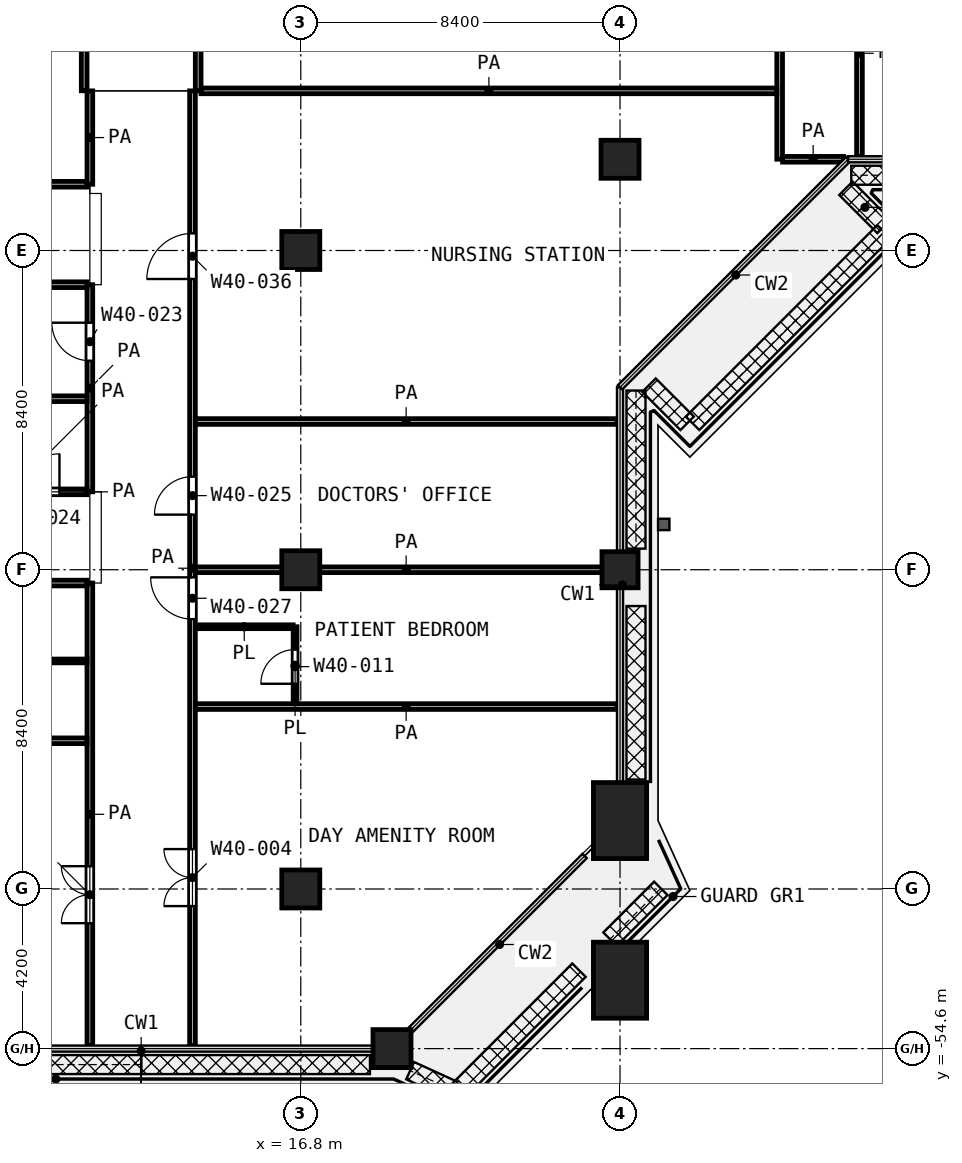
"""IFC4 building model, lengths in metres.
Left out: names, types, materials, properties, quantities, classifications, styles, units other than length and angle.
Written with IfcOpenShell. Run it as: python <this file> out.ifc"""

import sys

from ifc_helpers import new_model, si_unit, direction, frame, frame_2d, origin, origin_2d, place, context, subcontext, project, spatial, rectangle, extrude, element, fill, save


model = new_model("IFC4")
c1 = context("Model", 3, precision=1e-05, world=origin(), true_north=direction((0.0, 1.0)))
c2 = subcontext(c1, "Body", "Model", "MODEL_VIEW")
j1 = project(units=[si_unit("LENGTHUNIT", "METRE"), si_unit("PLANEANGLEUNIT", "RADIAN")], contexts=[c1])
p1 = place(None, origin())
s1 = spatial("IfcSite", under=j1, at=p1, CompositionType="ELEMENT")
p2 = place(p1, origin())
s2 = spatial("IfcBuilding", under=s1, at=p2, CompositionType="ELEMENT")
p3 = place(p2, frame((0.0, 0.0, 175.2)))
s3 = spatial("IfcBuildingStorey", under=s2, at=p3, CompositionType="ELEMENT", Elevation=175.2)
for number, where, z_axis, x_axis in (
    (1, (25.2, -31.2, 0.0), (0.0, 0.0, 1.0), (1.0, 0.0, 0.0)),
    (2, (16.8, -33.6, 0.0), (0.0, 0.0, 1.0), (1.0, 0.0, 0.0)),
    (3, (16.8, -42.0, 0.0), (0.0, 0.0, 1.0), (1.0, 0.0, 0.0)),
):
    element("IfcColumn", number, at=place(p3, frame(where, z_axis=z_axis, x_axis=x_axis)), inside=s3, PredefinedType="COLUMN", context=c2, shape_type="SweptSolid", body=[
        extrude(rectangle(XDim=1.0, YDim=1.0, at=origin_2d()), origin(), (0.0, 0.0, 1.0), 4.2),
    ])
p4 = place(p3, frame((25.2, -42.0, 0.0), z_axis=(0.0, 0.0, 1.0), x_axis=(1.0, 0.0, 0.0)))
e4 = element("IfcColumn", 4, at=p4, inside=s3, PredefinedType="COLUMN", context=c2, shape_type="SweptSolid", body=[
    extrude(rectangle(XDim=0.95, YDim=0.95, at=origin_2d()), origin(), (0.0, 0.0, 1.0), 4.2),
])
p5 = place(p3, frame((25.2, -48.6, 0.0), z_axis=(0.0, 0.0, 1.0), x_axis=(0.0, -1.0, 0.0)))
e5 = element("IfcColumn", 5, at=p5, inside=s3, PredefinedType="COLUMN", context=c2, shape_type="SweptSolid", body=[
    extrude(rectangle(XDim=2.0, YDim=1.4, at=origin_2d()), origin(), (0.0, 0.0, 1.0), 4.2),
])
for number, where, z_axis, x_axis in (
    (6, (16.8, -50.4, 0.0), (0.0, 0.0, 1.0), (1.0, 0.0, 0.0)),
    (7, (19.2, -54.6, 0.0), (0.0, 0.0, 1.0), (1.0, 0.0, 0.0)),
):
    element("IfcColumn", number, at=place(p3, frame(where, z_axis=z_axis, x_axis=x_axis)), inside=s3, PredefinedType="COLUMN", context=c2, shape_type="SweptSolid", body=[
        extrude(rectangle(XDim=1.0, YDim=1.0, at=origin_2d()), origin(), (0.0, 0.0, 1.0), 4.2),
    ])
p6 = place(p3, frame((25.2, -52.8, 0.0), z_axis=(0.0, 0.0, 1.0), x_axis=(0.0, -1.0, 0.0)))
e8 = element("IfcColumn", 8, at=p6, inside=s3, PredefinedType="COLUMN", context=c2, shape_type="SweptSolid", body=[
    extrude(rectangle(XDim=2.0, YDim=1.4, at=origin_2d()), origin(), (0.0, 0.0, 1.0), 4.2),
])
p7 = place(p3, frame((8.6, -44.4, 0.0), z_axis=(0.0, 0.0, 1.0), x_axis=(1.0, 0.0, 0.0)))
e9 = element("IfcWall", 9, at=p7, inside=s3, PredefinedType="PARTITIONING", context=c2, shape_type="SweptSolid", body=[
    extrude(rectangle(XDim=2.575, YDim=0.1, at=frame_2d((1.288, 0.0))), origin(), (0.0, 0.0, 1.0), 3.6),
])
p8 = place(p3, frame((14.025, -43.5, 0.0), z_axis=(0.0, 0.0, 1.0), x_axis=(1.0, 0.0, 0.0)))
e10 = element("IfcWall", 10, at=p8, inside=s3, PredefinedType="PARTITIONING", context=c2, shape_type="SweptSolid", body=[
    extrude(rectangle(XDim=2.575, YDim=0.1, at=frame_2d((1.288, 0.0))), origin(), (0.0, 0.0, 1.0), 3.6),
])
p9 = place(p3, frame((16.65, -45.525, 0.0), z_axis=(0.0, 0.0, 1.0), x_axis=(0.0, 1.0, 0.0)))
e11 = element("IfcWall", 11, at=p9, inside=s3, PredefinedType="PARTITIONING", context=c2, shape_type="SweptSolid", body=[
    extrude(rectangle(XDim=2.025, YDim=0.1, at=frame_2d((1.012, 0.0))), origin(), (0.0, 0.0, 1.0), 3.6),
])
p10 = place(p9, frame((0.525, 0.0, 0.0)))
e12 = element("IfcOpeningElement", 12, at=p10, cuts=e11, PredefinedType="OPENING", context=c2, shape_type="SweptSolid", body=[
    extrude(rectangle(XDim=0.9, YDim=2.1, at=frame_2d((0.45, 1.05))), frame((0.0, 0.06, 0.0), z_axis=(0.0, -1.0, 0.0), x_axis=(1.0, 0.0, 0.0)), (0.0, 0.0, 1.0), 0.12),
])
p11 = place(p3, frame((0.08, -46.5, 0.0), z_axis=(0.0, 0.0, 1.0), x_axis=(1.0, 0.0, 0.0)))
e13 = element("IfcWall", 13, at=p11, inside=s3, PredefinedType="PARTITIONING", context=c2, shape_type="SweptSolid", body=[
    extrude(rectangle(XDim=11.095, YDim=0.15, at=frame_2d((5.547, 0.0))), origin(), (0.0, 0.0, 1.0), 3.6),
])
p12 = place(p3, frame((14.025, -45.6, 0.0), z_axis=(0.0, 0.0, 1.0), x_axis=(1.0, 0.0, 0.0)))
e14 = element("IfcWall", 14, at=p12, inside=s3, PredefinedType="PARTITIONING", context=c2, shape_type="SweptSolid", body=[
    extrude(rectangle(XDim=11.095, YDim=0.15, at=frame_2d((5.548, 0.0))), origin(), (0.0, 0.0, 1.0), 3.6),
])
p13 = place(p3, frame((2.327, -42.35, 0.0), z_axis=(0.0, 0.0, 1.0), x_axis=(1.0, 0.0, 0.0)))
e15 = element("IfcWall", 15, at=p13, inside=s3, PredefinedType="PARTITIONING", context=c2, shape_type="SweptSolid", body=[
    extrude(rectangle(XDim=8.848, YDim=0.15, at=frame_2d((4.424, 0.0))), origin(), (0.0, 0.0, 1.0), 3.6),
])
p14 = place(p13, frame((4.324, 0.0, 0.0)))
e16 = element("IfcOpeningElement", 16, at=p14, cuts=e15, PredefinedType="OPENING", context=c2, shape_type="SweptSolid", body=[
    extrude(rectangle(XDim=1.2, YDim=2.1, at=frame_2d((0.6, 1.05))), frame((0.0, 0.085, 0.0), z_axis=(0.0, -1.0, 0.0), x_axis=(1.0, 0.0, 0.0)), (0.0, 0.0, 1.0), 0.17),
])
p15 = place(p13, frame((2.324, 0.0, 0.0)))
e17 = element("IfcOpeningElement", 17, at=p15, cuts=e15, PredefinedType="OPENING", context=c2, shape_type="SweptSolid", body=[
    extrude(rectangle(XDim=1.2, YDim=2.1, at=frame_2d((0.6, 1.05))), frame((0.0, 0.085, 0.0), z_axis=(0.0, -1.0, 0.0), x_axis=(1.0, 0.0, 0.0)), (0.0, 0.0, 1.0), 0.17),
])
p16 = place(p3, frame((14.025, -42.0, 0.0), z_axis=(0.0, 0.0, 1.0), x_axis=(1.0, 0.0, 0.0)))
e18 = element("IfcWall", 18, at=p16, inside=s3, PredefinedType="PARTITIONING", context=c2, shape_type="SweptSolid", body=[
    extrude(rectangle(XDim=11.095, YDim=0.15, at=frame_2d((5.548, 0.0))), origin(), (0.0, 0.0, 1.0), 3.6),
])
p17 = place(p3, frame((8.65, -39.95, 0.0), z_axis=(0.0, 0.0, 1.0), x_axis=(1.0, 0.0, 0.0)))
e19 = element("IfcWall", 19, at=p17, inside=s3, PredefinedType="PARTITIONING", context=c2, shape_type="SweptSolid", body=[
    extrude(rectangle(XDim=2.525, YDim=0.15, at=frame_2d((1.263, 0.0))), origin(), (0.0, 0.0, 1.0), 3.6),
])
p18 = place(p17, frame((0.8, 0.0, 0.0)))
e20 = element("IfcOpeningElement", 20, at=p18, cuts=e19, PredefinedType="OPENING", context=c2, shape_type="SweptSolid", body=[
    extrude(rectangle(XDim=1.0, YDim=2.1, at=frame_2d((0.5, 1.05))), frame((0.0, 0.085, 0.0), z_axis=(0.0, -1.0, 0.0), x_axis=(1.0, 0.0, 0.0)), (0.0, 0.0, 1.0), 0.17),
])
p19 = place(p3, frame((14.025, -38.1, 0.0), z_axis=(0.0, 0.0, 1.0), x_axis=(1.0, 0.0, 0.0)))
e21 = element("IfcWall", 21, at=p19, inside=s3, PredefinedType="PARTITIONING", context=c2, shape_type="SweptSolid", body=[
    extrude(rectangle(XDim=11.095, YDim=0.15, at=frame_2d((5.548, 0.0))), origin(), (0.0, 0.0, 1.0), 3.6),
])
p20 = place(p3, frame((8.65, -37.5, 0.0), z_axis=(0.0, 0.0, 1.0), x_axis=(1.0, 0.0, 0.0)))
e22 = element("IfcWall", 22, at=p20, inside=s3, PredefinedType="PARTITIONING", context=c2, shape_type="SweptSolid", body=[
    extrude(rectangle(XDim=2.525, YDim=0.15, at=frame_2d((1.263, 0.0))), origin(), (0.0, 0.0, 1.0), 3.6),
])
p21 = place(p3, frame((8.975, -34.5, 0.0), z_axis=(0.0, 0.0, 1.0), x_axis=(1.0, 0.0, 0.0)))
e23 = element("IfcWall", 23, at=p21, inside=s3, PredefinedType="PARTITIONING", context=c2, shape_type="SweptSolid", body=[
    extrude(rectangle(XDim=2.2, YDim=0.15, at=frame_2d((1.1, 0.0))), origin(), (0.0, 0.0, 1.0), 3.6),
])
p22 = place(p3, frame((0.08, -31.857, 0.0), z_axis=(0.0, 0.0, 1.0), x_axis=(1.0, 0.0, 0.0)))
e24 = element("IfcWall", 24, at=p22, inside=s3, PredefinedType="PARTITIONING", context=c2, shape_type="SweptSolid", body=[
    extrude(rectangle(XDim=11.095, YDim=0.15, at=frame_2d((5.547, 0.0))), origin(), (0.0, 0.0, 1.0), 3.6),
])
p23 = place(p22, frame((4.945, 0.0, 0.0)))
e25 = element("IfcOpeningElement", 25, at=p23, cuts=e24, PredefinedType="OPENING", context=c2, shape_type="SweptSolid", body=[
    extrude(rectangle(XDim=1.2, YDim=2.1, at=frame_2d((0.6, 1.05))), frame((0.0, 0.085, 0.0), z_axis=(0.0, -1.0, 0.0), x_axis=(1.0, 0.0, 0.0)), (0.0, 0.0, 1.0), 0.17),
])
p24 = place(p3, frame((29.477, -31.2, 0.0), z_axis=(0.0, 0.0, 1.0), x_axis=(1.0, 0.0, 0.0)))
e26 = element("IfcWall", 26, at=p24, inside=s3, PredefinedType="PARTITIONING", context=c2, shape_type="SweptSolid", body=[
    extrude(rectangle(XDim=1.61, YDim=0.15, at=frame_2d((0.805, 0.0))), origin(), (0.0, 0.0, 1.0), 3.6),
])
p25 = place(p3, frame((14.175, -29.4, 0.0), z_axis=(0.0, 0.0, 1.0), x_axis=(1.0, 0.0, 0.0)))
e27 = element("IfcWall", 27, at=p25, inside=s3, PredefinedType="PARTITIONING", context=c2, shape_type="SweptSolid", body=[
    extrude(rectangle(XDim=15.15, YDim=0.15, at=frame_2d((7.575, 0.0))), origin(), (0.0, 0.0, 1.0), 3.6),
])
p26 = place(p3, frame((11.1, -29.398, 0.0), z_axis=(0.0, 0.0, 1.0), x_axis=(0.0, 1.0, 0.0)))
e28 = element("IfcWall", 28, at=p26, inside=s3, PredefinedType="PARTITIONING", context=c2, shape_type="SweptSolid", body=[
    extrude(rectangle(XDim=4.498, YDim=0.15, at=frame_2d((2.249, 0.0))), origin(), (0.0, 0.0, 1.0), 3.6),
])
p27 = place(p3, frame((11.25, -54.52, 0.0), z_axis=(0.0, 0.0, 1.0), x_axis=(0.0, 1.0, 0.0)))
e29 = element("IfcWall", 29, at=p27, inside=s3, PredefinedType="PARTITIONING", context=c2, shape_type="SweptSolid", body=[
    extrude(rectangle(XDim=12.17, YDim=0.15, at=frame_2d((6.085, 0.0))), origin(), (0.0, 0.0, 1.0), 3.6),
])
p28 = place(p27, frame((3.22, 0.0, 0.0)))
e30 = element("IfcOpeningElement", 30, at=p28, cuts=e29, PredefinedType="OPENING", context=c2, shape_type="SweptSolid", body=[
    extrude(rectangle(XDim=1.5, YDim=2.1, at=frame_2d((0.75, 1.05))), frame((0.0, 0.085, 0.0), z_axis=(0.0, -1.0, 0.0), x_axis=(1.0, 0.0, 0.0)), (0.0, 0.0, 1.0), 0.17),
])
p29 = place(p3, frame((11.25, -39.95, 0.0), z_axis=(0.0, 0.0, 1.0), x_axis=(0.0, 1.0, 0.0)))
e31 = element("IfcWall", 31, at=p29, inside=s3, PredefinedType="PARTITIONING", context=c2, shape_type="SweptSolid", body=[
    extrude(rectangle(XDim=5.45, YDim=0.15, at=frame_2d((2.725, 0.0))), origin(), (0.0, 0.0, 1.0), 3.6),
])
p30 = place(p29, frame((3.45, 0.0, 0.0)))
e32 = element("IfcOpeningElement", 32, at=p30, cuts=e31, PredefinedType="OPENING", context=c2, shape_type="SweptSolid", body=[
    extrude(rectangle(XDim=1.0, YDim=2.1, at=frame_2d((0.5, 1.05))), frame((0.0, 0.085, 0.0), z_axis=(0.0, -1.0, 0.0), x_axis=(1.0, 0.0, 0.0)), (0.0, 0.0, 1.0), 0.17),
])
p31 = place(p3, frame((11.25, -31.857, 0.0), z_axis=(0.0, 0.0, 1.0), x_axis=(0.0, 1.0, 0.0)))
e33 = element("IfcWall", 33, at=p31, inside=s3, PredefinedType="PARTITIONING", context=c2, shape_type="SweptSolid", body=[
    extrude(rectangle(XDim=2.457, YDim=0.15, at=frame_2d((1.229, 0.0))), origin(), (0.0, 0.0, 1.0), 3.6),
])
p32 = place(p3, frame((13.95, -54.52, 0.0), z_axis=(0.0, 0.0, 1.0), x_axis=(0.0, 1.0, 0.0)))
e34 = element("IfcWall", 34, at=p32, inside=s3, PredefinedType="PARTITIONING", context=c2, shape_type="SweptSolid", body=[
    extrude(rectangle(XDim=25.12, YDim=0.15, at=frame_2d((12.56, 0.0))), origin(), (0.0, 0.0, 1.0), 3.6),
])
p33 = place(p32, frame((20.17, 0.0, 0.0)))
e35 = element("IfcOpeningElement", 35, at=p33, cuts=e34, PredefinedType="OPENING", context=c2, shape_type="SweptSolid", body=[
    extrude(rectangle(XDim=1.2, YDim=2.1, at=frame_2d((0.6, 1.05))), frame((0.0, 0.085, 0.0), z_axis=(0.0, -1.0, 0.0), x_axis=(1.0, 0.0, 0.0)), (0.0, 0.0, 1.0), 0.17),
])
p34 = place(p32, frame((13.97, 0.0, 0.0)))
e36 = element("IfcOpeningElement", 36, at=p34, cuts=e34, PredefinedType="OPENING", context=c2, shape_type="SweptSolid", body=[
    extrude(rectangle(XDim=1.0, YDim=2.1, at=frame_2d((0.5, 1.05))), frame((0.0, 0.085, 0.0), z_axis=(0.0, -1.0, 0.0), x_axis=(1.0, 0.0, 0.0)), (0.0, 0.0, 1.0), 0.17),
])
p35 = place(p32, frame((11.22, 0.0, 0.0)))
e37 = element("IfcOpeningElement", 37, at=p35, cuts=e34, PredefinedType="OPENING", context=c2, shape_type="SweptSolid", body=[
    extrude(rectangle(XDim=1.1, YDim=2.1, at=frame_2d((0.55, 1.05))), frame((0.0, 0.085, 0.0), z_axis=(0.0, -1.0, 0.0), x_axis=(1.0, 0.0, 0.0)), (0.0, 0.0, 1.0), 0.17),
])
p36 = place(p32, frame((3.67, 0.0, 0.0)))
e38 = element("IfcOpeningElement", 38, at=p36, cuts=e34, PredefinedType="OPENING", context=c2, shape_type="SweptSolid", body=[
    extrude(rectangle(XDim=1.5, YDim=2.1, at=frame_2d((0.75, 1.05))), frame((0.0, 0.085, 0.0), z_axis=(0.0, -1.0, 0.0), x_axis=(1.0, 0.0, 0.0)), (0.0, 0.0, 1.0), 0.17),
])
p37 = place(p3, frame((14.1, -29.4, 0.0), z_axis=(0.0, 0.0, 1.0), x_axis=(0.0, 1.0, 0.0)))
e39 = element("IfcWall", 39, at=p37, inside=s3, PredefinedType="PARTITIONING", context=c2, shape_type="SweptSolid", body=[
    extrude(rectangle(XDim=4.5, YDim=0.15, at=frame_2d((2.25, 0.0))), origin(), (0.0, 0.0, 1.0), 3.6),
])
p38 = place(p3, frame((29.4, -31.198, 0.0), z_axis=(0.0, 0.0, 1.0), x_axis=(0.0, 1.0, 0.0)))
e40 = element("IfcWall", 40, at=p38, inside=s3, PredefinedType="PARTITIONING", context=c2, shape_type="SweptSolid", body=[
    extrude(rectangle(XDim=17.098, YDim=0.15, at=frame_2d((8.549, 0.0))), origin(), (0.0, 0.0, 1.0), 3.6),
])
p39 = place(p3, frame((31.5, -31.12, 0.0), z_axis=(0.0, 0.0, 1.0), x_axis=(0.0, 1.0, 0.0)))
e41 = element("IfcWall", 41, at=p39, inside=s3, PredefinedType="PARTITIONING", context=c2, shape_type="SweptSolid", body=[
    extrude(rectangle(XDim=5.418, YDim=0.15, at=frame_2d((2.709, 0.0))), origin(), (0.0, 0.0, 1.0), 3.6),
])
p40 = place(p30, origin())
e42 = element("IfcDoor", 42, at=p40, inside=s3, OperationType="SINGLE_SWING_RIGHT", PredefinedType="DOOR", context=c2, shape_type="SweptSolid", body=[
    extrude(rectangle(XDim=1.0, YDim=2.1, at=frame_2d((0.5, 1.05))), frame((0.0, 0.025, 0.0), z_axis=(0.0, -1.0, 0.0), x_axis=(1.0, 0.0, 0.0)), (0.0, 0.0, 1.0), 0.05),
])
fill(e32, e42)
p41 = place(p18, origin())
e43 = element("IfcDoor", 43, at=p41, inside=s3, OperationType="SINGLE_SWING_RIGHT", PredefinedType="DOOR", context=c2, shape_type="SweptSolid", body=[
    extrude(rectangle(XDim=1.0, YDim=2.1, at=frame_2d((0.5, 1.05))), frame((0.0, 0.025, 0.0), z_axis=(0.0, -1.0, 0.0), x_axis=(1.0, 0.0, 0.0)), (0.0, 0.0, 1.0), 0.05),
])
fill(e20, e43)
p42 = place(p28, origin())
e44 = element("IfcDoor", 44, at=p42, inside=s3, OperationType="DOUBLE_DOOR_SINGLE_SWING", PredefinedType="DOOR", context=c2, shape_type="SweptSolid", body=[
    extrude(rectangle(XDim=1.5, YDim=2.1, at=frame_2d((0.75, 1.05))), frame((0.0, 0.025, 0.0), z_axis=(0.0, -1.0, 0.0), x_axis=(1.0, 0.0, 0.0)), (0.0, 0.0, 1.0), 0.05),
])
fill(e30, e44)
p43 = place(p33, origin())
e45 = element("IfcDoor", 45, at=p43, inside=s3, OperationType="SINGLE_SWING_LEFT", PredefinedType="DOOR", context=c2, shape_type="SweptSolid", body=[
    extrude(rectangle(XDim=1.2, YDim=2.1, at=frame_2d((0.6, 1.05))), frame((0.0, 0.025, 0.0), z_axis=(0.0, -1.0, 0.0), x_axis=(1.0, 0.0, 0.0)), (0.0, 0.0, 1.0), 0.05),
])
fill(e35, e45)
p44 = place(p34, origin())
e46 = element("IfcDoor", 46, at=p44, inside=s3, OperationType="SINGLE_SWING_LEFT", PredefinedType="DOOR", context=c2, shape_type="SweptSolid", body=[
    extrude(rectangle(XDim=1.0, YDim=2.1, at=frame_2d((0.5, 1.05))), frame((0.0, 0.025, 0.0), z_axis=(0.0, -1.0, 0.0), x_axis=(1.0, 0.0, 0.0)), (0.0, 0.0, 1.0), 0.05),
])
fill(e36, e46)
p45 = place(p35, origin())
e47 = element("IfcDoor", 47, at=p45, inside=s3, OperationType="SINGLE_SWING_RIGHT", PredefinedType="DOOR", context=c2, shape_type="SweptSolid", body=[
    extrude(rectangle(XDim=1.1, YDim=2.1, at=frame_2d((0.55, 1.05))), frame((0.0, 0.025, 0.0), z_axis=(0.0, -1.0, 0.0), x_axis=(1.0, 0.0, 0.0)), (0.0, 0.0, 1.0), 0.05),
])
fill(e37, e47)
p46 = place(p10, origin())
e48 = element("IfcDoor", 48, at=p46, inside=s3, OperationType="SINGLE_SWING_LEFT", PredefinedType="DOOR", context=c2, shape_type="SweptSolid", body=[
    extrude(rectangle(XDim=0.9, YDim=2.1, at=frame_2d((0.45, 1.05))), frame((0.0, 0.025, 0.0), z_axis=(0.0, -1.0, 0.0), x_axis=(1.0, 0.0, 0.0)), (0.0, 0.0, 1.0), 0.05),
])
fill(e12, e48)
p47 = place(p36, origin())
e49 = element("IfcDoor", 49, at=p47, inside=s3, OperationType="DOUBLE_DOOR_SINGLE_SWING", PredefinedType="DOOR", context=c2, shape_type="SweptSolid", body=[
    extrude(rectangle(XDim=1.5, YDim=2.1, at=frame_2d((0.75, 1.05))), frame((0.0, 0.025, 0.0), z_axis=(0.0, -1.0, 0.0), x_axis=(1.0, 0.0, 0.0)), (0.0, 0.0, 1.0), 0.05),
])
fill(e38, e49)
save(model, sys.argv[1])
